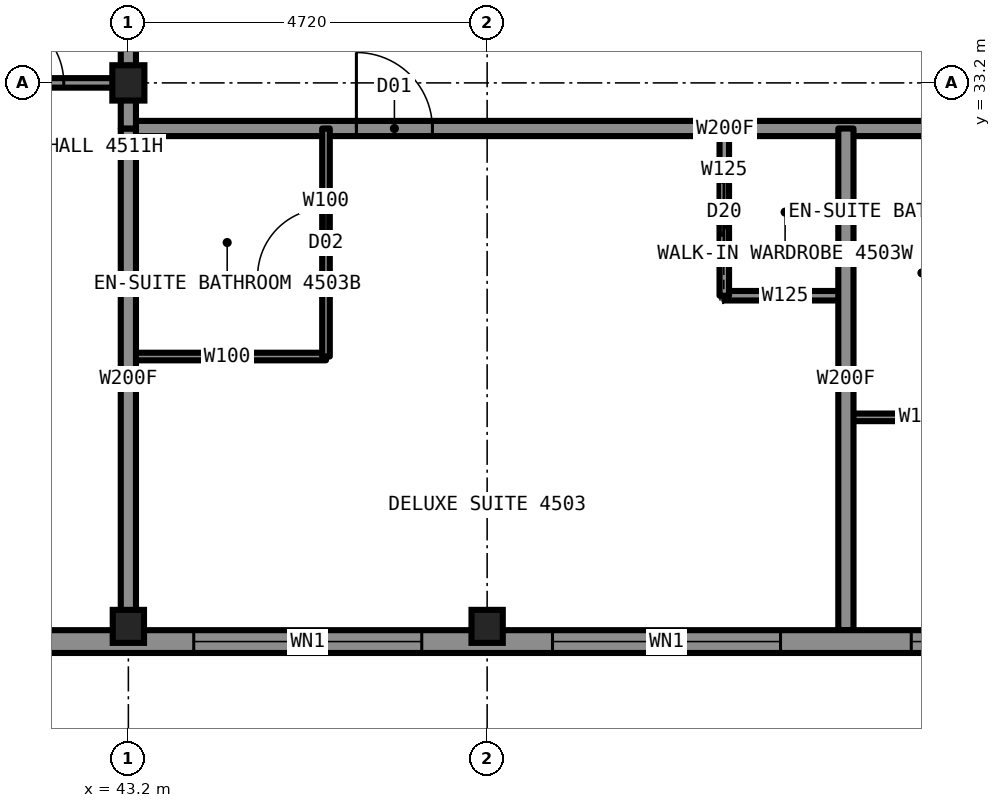
"""IFC4 building model, lengths in metres.
Left out: names, types, materials, properties, quantities, classifications, styles, units other than length and angle.
Written with IfcOpenShell. Run it as: python <this file> out.ifc"""

import sys

from ifc_helpers import new_model, si_unit, direction, frame, frame_2d, origin, origin_2d, place, context, subcontext, project, spatial, rectangle, i_section, extrude, element, fill, save


model = new_model("IFC4")
c1 = context("Model", 3, precision=1e-05, world=origin(), true_north=direction((0.0, 1.0)))
c2 = subcontext(c1, "Body", "Model", "MODEL_VIEW")
j1 = project(units=[si_unit("LENGTHUNIT", "METRE"), si_unit("PLANEANGLEUNIT", "RADIAN")], contexts=[c1])
p1 = place(None, origin())
s1 = spatial("IfcSite", under=j1, at=p1, CompositionType="ELEMENT")
p2 = place(p1, origin())
s2 = spatial("IfcBuilding", under=s1, at=p2, CompositionType="ELEMENT")
p3 = place(p2, frame((0.0, 0.0, 161.8)))
s3 = spatial("IfcBuildingStorey", under=s2, at=p3, CompositionType="ELEMENT", Elevation=161.8)
for number, where, z_axis, x_axis in (
    (1, (43.2, 26.05, 0.0), (0.0, 0.0, 1.0), (1.0, 0.0, 0.0)),
    (2, (47.92, 26.05, 0.0), (0.0, 0.0, 1.0), (1.0, 0.0, 0.0)),
):
    element("IfcColumn", number, at=place(p3, frame(where, z_axis=z_axis, x_axis=x_axis)), inside=s3, PredefinedType="COLUMN", context=c2, shape_type="SweptSolid", body=[
        extrude(i_section(OverallWidth=0.442, OverallDepth=0.531, WebThickness=0.066, FlangeThickness=0.106, at=origin_2d()), origin(), (0.0, 0.0, 1.0), 3.5),
    ])
p4 = place(p3, frame((43.2, 33.2, 0.0), z_axis=(0.0, 0.0, 1.0), x_axis=(1.0, 0.0, 0.0)))
e3 = element("IfcColumn", 3, at=p4, inside=s3, PredefinedType="COLUMN", context=c2, shape_type="SweptSolid", body=[
    extrude(i_section(OverallWidth=0.422, OverallDepth=0.465, WebThickness=0.045, FlangeThickness=0.073, at=origin_2d()), origin(), (0.0, 0.0, 1.0), 3.5),
])
p5 = place(p3, frame((36.0, 33.2, 0.0), z_axis=(0.0, 0.0, 1.0), x_axis=(1.0, 0.0, 0.0)))
e4 = element("IfcWall", 4, at=p5, inside=s3, PredefinedType="PARTITIONING", context=c2, shape_type="SweptSolid", body=[
    extrude(rectangle(XDim=7.2, YDim=0.125, at=frame_2d((3.6, 0.0))), origin(), (0.0, 0.0, 1.0), 2.573),
])
p6 = place(p5, frame((5.45, 0.0, 0.0)))
e5 = element("IfcOpeningElement", 5, at=p6, cuts=e4, PredefinedType="OPENING", context=c2, shape_type="SweptSolid", body=[
    extrude(rectangle(XDim=0.9, YDim=2.2, at=frame_2d((0.45, 1.1))), frame((0.0, 0.073, 0.0), z_axis=(0.0, -1.0, 0.0), x_axis=(1.0, 0.0, 0.0)), (0.0, 0.0, 1.0), 0.145),
])
p7 = place(p3, frame((43.2, 32.6, 0.0), z_axis=(0.0, 0.0, 1.0), x_axis=(1.0, 0.0, 0.0)))
e6 = element("IfcWall", 6, at=p7, inside=s3, PredefinedType="PARTITIONING", context=c2, shape_type="SweptSolid", body=[
    extrude(rectangle(XDim=23.6, YDim=0.2, at=frame_2d((11.8, 0.0))), origin(), (0.0, 0.0, 1.0), 3.33),
])
p8 = place(p7, frame((3.0, 0.0, 0.0)))
e7 = element("IfcOpeningElement", 7, at=p8, cuts=e6, PredefinedType="OPENING", context=c2, shape_type="SweptSolid", body=[
    extrude(rectangle(XDim=1.0, YDim=2.2, at=frame_2d((0.5, 1.1))), frame((0.0, 0.11, 0.0), z_axis=(0.0, -1.0, 0.0), x_axis=(1.0, 0.0, 0.0)), (0.0, 0.0, 1.0), 0.22),
])
p9 = place(p7, frame((11.7, 0.0, 0.0)))
e8 = element("IfcOpeningElement", 8, at=p9, cuts=e6, PredefinedType="OPENING", context=c2, shape_type="SweptSolid", body=[
    extrude(rectangle(XDim=1.0, YDim=2.2, at=frame_2d((0.5, 1.1))), frame((0.0, 0.11, 0.0), z_axis=(0.0, -1.0, 0.0), x_axis=(1.0, 0.0, 0.0)), (0.0, 0.0, 1.0), 0.22),
])
p10 = place(p7, frame((17.16, 0.0, 0.0)))
e9 = element("IfcOpeningElement", 9, at=p10, cuts=e6, PredefinedType="OPENING", context=c2, shape_type="SweptSolid", body=[
    extrude(rectangle(XDim=1.0, YDim=2.2, at=frame_2d((0.5, 1.1))), frame((0.0, 0.11, 0.0), z_axis=(0.0, -1.0, 0.0), x_axis=(1.0, 0.0, 0.0)), (0.0, 0.0, 1.0), 0.22),
])
p11 = place(p3, frame((51.04, 30.4, 0.0), z_axis=(0.0, 0.0, 1.0), x_axis=(1.0, 0.0, 0.0)))
e10 = element("IfcWall", 10, at=p11, inside=s3, PredefinedType="PARTITIONING", context=c2, shape_type="SweptSolid", body=[
    extrude(rectangle(XDim=1.6, YDim=0.125, at=frame_2d((0.8, 0.0))), origin(), (0.0, 0.0, 1.0), 3.33),
])
p12 = place(p3, frame((43.2, 29.6, 0.0), z_axis=(0.0, 0.0, 1.0), x_axis=(1.0, 0.0, 0.0)))
e11 = element("IfcWall", 11, at=p12, inside=s3, PredefinedType="PARTITIONING", context=c2, shape_type="SweptSolid", body=[
    extrude(rectangle(XDim=2.6, YDim=0.1, at=frame_2d((1.3, 0.0))), origin(), (0.0, 0.0, 1.0), 3.33),
])
p13 = place(p3, frame((52.64, 28.8, 0.0), z_axis=(0.0, 0.0, 1.0), x_axis=(1.0, 0.0, 0.0)))
e12 = element("IfcWall", 12, at=p13, inside=s3, PredefinedType="PARTITIONING", context=c2, shape_type="SweptSolid", body=[
    extrude(rectangle(XDim=2.0, YDim=0.1, at=frame_2d((1.0, 0.0))), origin(), (0.0, 0.0, 1.0), 3.33),
])
p14 = place(p3, frame((43.2, 33.22, 0.0), z_axis=(0.0, 0.0, 1.0), x_axis=(0.0, 1.0, 0.0)))
e13 = element("IfcWall", 13, at=p14, inside=s3, PredefinedType="PARTITIONING", context=c2, shape_type="SweptSolid", body=[
    extrude(rectangle(XDim=23.56, YDim=0.2, at=frame_2d((11.78, 0.0))), origin(), (0.0, 0.0, 1.0), 3.33),
])
p15 = place(p14, frame((15.6, 0.0, 0.0)))
e14 = element("IfcOpeningElement", 14, at=p15, cuts=e13, PredefinedType="OPENING", context=c2, shape_type="SweptSolid", body=[
    extrude(rectangle(XDim=1.0, YDim=2.2, at=frame_2d((0.5, 1.1))), frame((0.0, 0.11, 0.0), z_axis=(0.0, -1.0, 0.0), x_axis=(1.0, 0.0, 0.0)), (0.0, 0.0, 1.0), 0.22),
])
p16 = place(p14, frame((22.03, 0.0, 0.0)))
e15 = element("IfcOpeningElement", 15, at=p16, cuts=e13, PredefinedType="OPENING", context=c2, shape_type="SweptSolid", body=[
    extrude(rectangle(XDim=1.1, YDim=2.2, at=frame_2d((0.55, 1.1))), frame((0.0, 0.11, 0.0), z_axis=(0.0, -1.0, 0.0), x_axis=(1.0, 0.0, 0.0)), (0.0, 0.0, 1.0), 0.22),
])
p17 = place(p14, frame((0.64, 0.0, 0.0)))
e16 = element("IfcOpeningElement", 16, at=p17, cuts=e13, PredefinedType="OPENING", context=c2, shape_type="SweptSolid", body=[
    extrude(rectangle(XDim=1.1, YDim=2.2, at=frame_2d((0.55, 1.1))), frame((0.0, 0.11, 0.0), z_axis=(0.0, -1.0, 0.0), x_axis=(1.0, 0.0, 0.0)), (0.0, 0.0, 1.0), 0.22),
])
p18 = place(p14, frame((7.45, 0.0, 0.0)))
e17 = element("IfcOpeningElement", 17, at=p18, cuts=e13, PredefinedType="OPENING", context=c2, shape_type="SweptSolid", body=[
    extrude(rectangle(XDim=2.0, YDim=2.4, at=frame_2d((1.0, 1.2))), frame((0.0, 0.11, 0.0), z_axis=(0.0, -1.0, 0.0), x_axis=(1.0, 0.0, 0.0)), (0.0, 0.0, 1.0), 0.22),
])
p19 = place(p14, frame((5.4, 0.0, 0.0)))
e18 = element("IfcOpeningElement", 18, at=p19, cuts=e13, PredefinedType="OPENING", context=c2, shape_type="SweptSolid", body=[
    extrude(rectangle(XDim=1.0, YDim=2.1, at=frame_2d((0.5, 1.05))), frame((0.0, 0.11, 0.0), z_axis=(0.0, -1.0, 0.0), x_axis=(1.0, 0.0, 0.0)), (0.0, 0.0, 1.0), 0.22),
])
p20 = place(p3, frame((43.2, 26.0, 0.0), z_axis=(0.0, 0.0, 1.0), x_axis=(0.0, 1.0, 0.0)))
e19 = element("IfcWall", 19, at=p20, inside=s3, PredefinedType="PARTITIONING", context=c2, shape_type="SweptSolid", body=[
    extrude(rectangle(XDim=6.6, YDim=0.2, at=frame_2d((3.3, 0.0))), origin(), (0.0, 0.0, 1.0), 2.573),
])
p21 = place(p3, frame((52.64, 26.0, 0.0), z_axis=(0.0, 0.0, 1.0), x_axis=(0.0, 1.0, 0.0)))
e20 = element("IfcWall", 20, at=p21, inside=s3, PredefinedType="PARTITIONING", context=c2, shape_type="SweptSolid", body=[
    extrude(rectangle(XDim=6.6, YDim=0.2, at=frame_2d((3.3, 0.0))), origin(), (0.0, 0.0, 1.0), 3.33),
])
p22 = place(p3, frame((51.04, 30.4, 0.0), z_axis=(0.0, 0.0, 1.0), x_axis=(0.0, 1.0, 0.0)))
e21 = element("IfcWall", 21, at=p22, inside=s3, PredefinedType="PARTITIONING", context=c2, shape_type="SweptSolid", body=[
    extrude(rectangle(XDim=2.2, YDim=0.125, at=frame_2d((1.1, 0.0))), origin(), (0.0, 0.0, 1.0), 3.33),
])
p23 = place(p22, frame((0.7, 0.0, 0.0)))
e22 = element("IfcOpeningElement", 22, at=p23, cuts=e21, PredefinedType="OPENING", context=c2, shape_type="SweptSolid", body=[
    extrude(rectangle(XDim=0.8, YDim=2.1, at=frame_2d((0.4, 1.05))), frame((0.0, 0.073, 0.0), z_axis=(0.0, -1.0, 0.0), x_axis=(1.0, 0.0, 0.0)), (0.0, 0.0, 1.0), 0.145),
])
p24 = place(p3, frame((45.8, 29.6, 0.0), z_axis=(0.0, 0.0, 1.0), x_axis=(0.0, 1.0, 0.0)))
e23 = element("IfcWall", 23, at=p24, inside=s3, PredefinedType="PARTITIONING", context=c2, shape_type="SweptSolid", body=[
    extrude(rectangle(XDim=3.0, YDim=0.1, at=frame_2d((1.5, 0.0))), origin(), (0.0, 0.0, 1.0), 3.33),
])
p25 = place(p24, frame((1.05, 0.0, 0.0)))
e24 = element("IfcOpeningElement", 24, at=p25, cuts=e23, PredefinedType="OPENING", context=c2, shape_type="SweptSolid", body=[
    extrude(rectangle(XDim=0.9, YDim=2.1, at=frame_2d((0.45, 1.05))), frame((0.0, 0.06, 0.0), z_axis=(0.0, -1.0, 0.0), x_axis=(1.0, 0.0, 0.0)), (0.0, 0.0, 1.0), 0.12),
])
p26 = place(p3, frame((41.2, 25.85, 0.0), z_axis=(0.0, 0.0, 1.0), x_axis=(1.0, 0.0, 0.0)))
e25 = element("IfcWall", 25, at=p26, inside=s3, PredefinedType="SOLIDWALL", context=c2, shape_type="SweptSolid", body=[
    extrude(rectangle(XDim=27.6, YDim=0.3, at=frame_2d((13.8, 0.0))), origin(), (0.0, 0.0, 1.0), 2.83),
])
p27 = place(p26, frame((2.86, 0.0, 0.3)))
e26 = element("IfcOpeningElement", 26, at=p27, cuts=e25, PredefinedType="OPENING", context=c2, shape_type="SweptSolid", body=[
    extrude(rectangle(XDim=3.0, YDim=2.0, at=frame_2d((1.5, 1.0))), frame((0.0, 0.16, 0.0), z_axis=(0.0, -1.0, 0.0), x_axis=(1.0, 0.0, 0.0)), (0.0, 0.0, 1.0), 0.32),
])
p28 = place(p26, frame((7.58, 0.0, 0.3)))
e27 = element("IfcOpeningElement", 27, at=p28, cuts=e25, PredefinedType="OPENING", context=c2, shape_type="SweptSolid", body=[
    extrude(rectangle(XDim=3.0, YDim=2.0, at=frame_2d((1.5, 1.0))), frame((0.0, 0.16, 0.0), z_axis=(0.0, -1.0, 0.0), x_axis=(1.0, 0.0, 0.0)), (0.0, 0.0, 1.0), 0.32),
])
p29 = place(p26, frame((12.3, 0.0, 0.3)))
e28 = element("IfcOpeningElement", 28, at=p29, cuts=e25, PredefinedType="OPENING", context=c2, shape_type="SweptSolid", body=[
    extrude(rectangle(XDim=3.0, YDim=2.0, at=frame_2d((1.5, 1.0))), frame((0.0, 0.16, 0.0), z_axis=(0.0, -1.0, 0.0), x_axis=(1.0, 0.0, 0.0)), (0.0, 0.0, 1.0), 0.32),
])
p30 = place(p26, frame((17.02, 0.0, 0.3)))
e29 = element("IfcOpeningElement", 29, at=p30, cuts=e25, PredefinedType="OPENING", context=c2, shape_type="SweptSolid", body=[
    extrude(rectangle(XDim=3.0, YDim=2.0, at=frame_2d((1.5, 1.0))), frame((0.0, 0.16, 0.0), z_axis=(0.0, -1.0, 0.0), x_axis=(1.0, 0.0, 0.0)), (0.0, 0.0, 1.0), 0.32),
])
p31 = place(p26, frame((21.74, 0.0, 0.3)))
e30 = element("IfcOpeningElement", 30, at=p31, cuts=e25, PredefinedType="OPENING", context=c2, shape_type="SweptSolid", body=[
    extrude(rectangle(XDim=3.0, YDim=2.0, at=frame_2d((1.5, 1.0))), frame((0.0, 0.16, 0.0), z_axis=(0.0, -1.0, 0.0), x_axis=(1.0, 0.0, 0.0)), (0.0, 0.0, 1.0), 0.32),
])
p32 = place(p3, frame((43.2, 32.6, 0.0), z_axis=(0.0, 0.0, 1.0), x_axis=(0.0, 1.0, 0.0)))
e31 = element("IfcWall", 31, at=p32, inside=s3, PredefinedType="PARTITIONING", context=c2, shape_type="SweptSolid", body=[
    extrude(rectangle(XDim=0.62, YDim=0.2, at=frame_2d((0.31, 0.0))), origin(), (0.0, 0.0, 1.0), 2.573),
])
p33 = place(p8, origin())
e32 = element("IfcDoor", 32, at=p33, inside=s3, OperationType="SINGLE_SWING_LEFT", PredefinedType="DOOR", context=c2, shape_type="SweptSolid", body=[
    extrude(rectangle(XDim=1.0, YDim=2.2, at=frame_2d((0.5, 1.1))), frame((0.0, 0.025, 0.0), z_axis=(0.0, -1.0, 0.0), x_axis=(1.0, 0.0, 0.0)), (0.0, 0.0, 1.0), 0.05),
])
fill(e7, e32)
p34 = place(p25, origin())
e33 = element("IfcDoor", 33, at=p34, inside=s3, OperationType="SINGLE_SWING_RIGHT", PredefinedType="DOOR", context=c2, shape_type="SweptSolid", body=[
    extrude(rectangle(XDim=0.9, YDim=2.1, at=frame_2d((0.45, 1.05))), frame((0.0, 0.025, 0.0), z_axis=(0.0, -1.0, 0.0), x_axis=(1.0, 0.0, 0.0)), (0.0, 0.0, 1.0), 0.05),
])
fill(e24, e33)
p35 = place(p23, origin())
e34 = element("IfcDoor", 34, at=p35, inside=s3, OperationType="SLIDING_TO_LEFT", PredefinedType="DOOR", context=c2, shape_type="SweptSolid", body=[
    extrude(rectangle(XDim=0.8, YDim=2.1, at=frame_2d((0.4, 1.05))), frame((0.0, 0.025, 0.0), z_axis=(0.0, -1.0, 0.0), x_axis=(1.0, 0.0, 0.0)), (0.0, 0.0, 1.0), 0.05),
])
fill(e22, e34)
p36 = place(p6, origin())
e35 = element("IfcDoor", 35, at=p36, inside=s3, OperationType="SINGLE_SWING_LEFT", PredefinedType="DOOR", context=c2, shape_type="SweptSolid", body=[
    extrude(rectangle(XDim=0.9, YDim=2.2, at=frame_2d((0.45, 1.1))), frame((0.0, 0.025, 0.0), z_axis=(0.0, -1.0, 0.0), x_axis=(1.0, 0.0, 0.0)), (0.0, 0.0, 1.0), 0.05),
])
fill(e5, e35)
p37 = place(p27, origin())
e36 = element("IfcWindow", 36, at=p37, inside=s3, PartitioningType="SINGLE_PANEL", PredefinedType="WINDOW", context=c2, shape_type="SweptSolid", body=[
    extrude(rectangle(XDim=3.0, YDim=2.0, at=frame_2d((1.5, 1.0))), frame((0.0, 0.13, 0.0), z_axis=(0.0, -1.0, 0.0), x_axis=(1.0, 0.0, 0.0)), (0.0, 0.0, 1.0), 0.06),
])
fill(e26, e36)
p38 = place(p28, origin())
e37 = element("IfcWindow", 37, at=p38, inside=s3, PartitioningType="SINGLE_PANEL", PredefinedType="WINDOW", context=c2, shape_type="SweptSolid", body=[
    extrude(rectangle(XDim=3.0, YDim=2.0, at=frame_2d((1.5, 1.0))), frame((0.0, 0.13, 0.0), z_axis=(0.0, -1.0, 0.0), x_axis=(1.0, 0.0, 0.0)), (0.0, 0.0, 1.0), 0.06),
])
fill(e27, e37)
p39 = place(p29, origin())
e38 = element("IfcWindow", 38, at=p39, inside=s3, PartitioningType="SINGLE_PANEL", PredefinedType="WINDOW", context=c2, shape_type="SweptSolid", body=[
    extrude(rectangle(XDim=3.0, YDim=2.0, at=frame_2d((1.5, 1.0))), frame((0.0, 0.13, 0.0), z_axis=(0.0, -1.0, 0.0), x_axis=(1.0, 0.0, 0.0)), (0.0, 0.0, 1.0), 0.06),
])
fill(e28, e38)
save(model, sys.argv[1])
